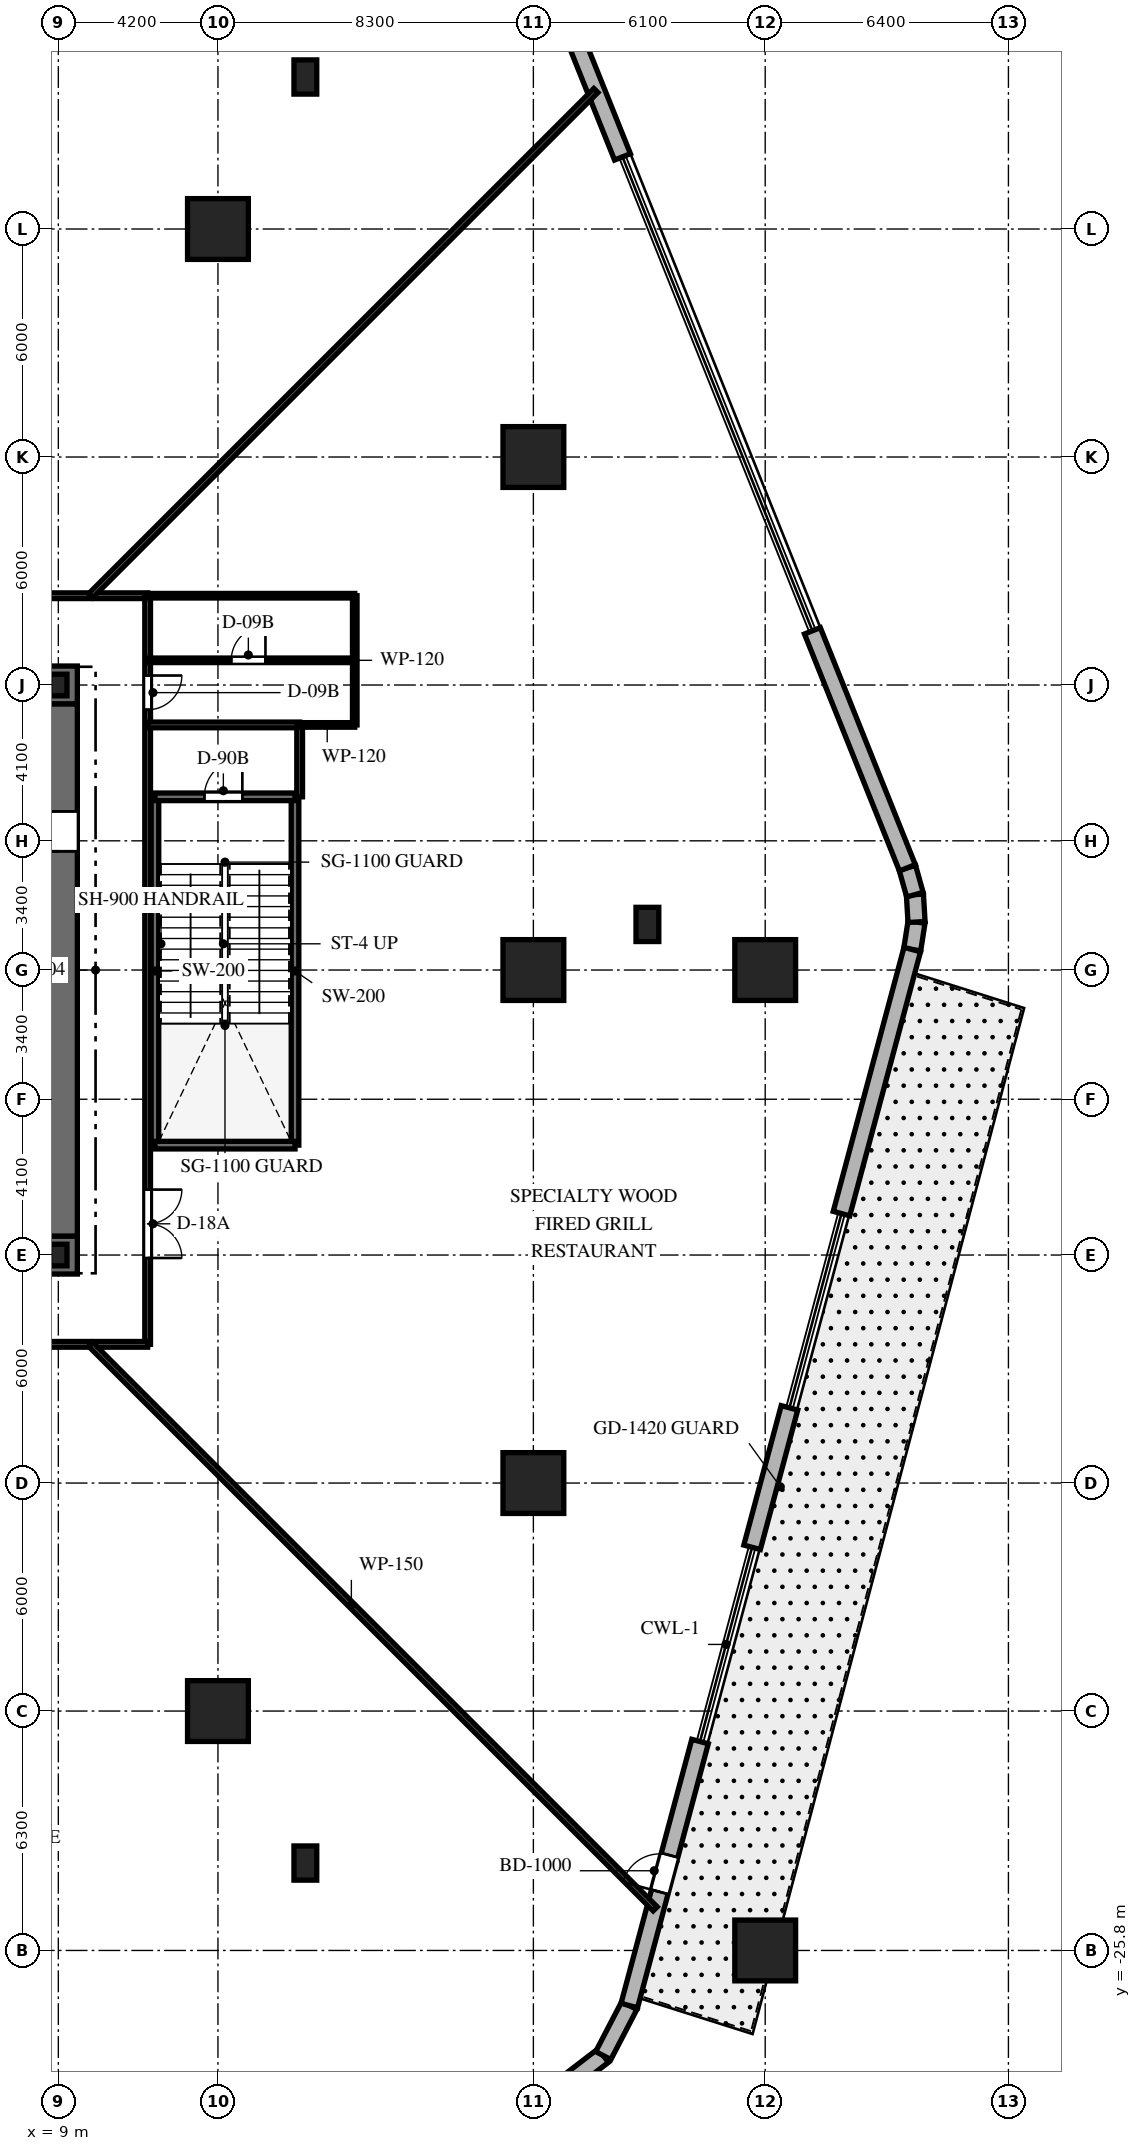
"""IFC4 building model, lengths in metres.
Left out: names, types, materials, properties, quantities, classifications, styles, units other than length and angle.
Written with IfcOpenShell. Run it as: python <this file> out.ifc"""

import sys

from ifc_helpers import new_model, si_unit, direction, frame, frame_2d, origin, origin_2d, place, context, subcontext, project, spatial, rectangle, i_section, extrude, element, fill, save


model = new_model("IFC4")
c1 = context("Model", 3, precision=1e-05, world=origin(), true_north=direction((0.0, 1.0)))
c2 = subcontext(c1, "Body", "Model", "MODEL_VIEW")
j1 = project(units=[si_unit("LENGTHUNIT", "METRE"), si_unit("PLANEANGLEUNIT", "RADIAN")], contexts=[c1])
p1 = place(None, origin())
s1 = spatial("IfcSite", under=j1, at=p1, CompositionType="ELEMENT")
p2 = place(p1, origin())
s2 = spatial("IfcBuilding", under=s1, at=p2, CompositionType="ELEMENT")
p3 = place(p2, frame((0.0, 0.0, 6.0)))
s3 = spatial("IfcBuildingStorey", under=s2, at=p3, CompositionType="ELEMENT", Elevation=6.0)
p4 = place(p3, frame((-9.5, -7.5, 0.0), z_axis=(0.0, 0.0, 1.0), x_axis=(1.0, 0.0, 0.0)))
e1 = element("IfcWall", 1, at=p4, inside=s3, PredefinedType="SHEAR", context=c2, shape_type="SweptSolid", body=[
    extrude(rectangle(XDim=19.0, YDim=1.0, at=frame_2d((9.5, 0.0))), origin(), (0.0, 0.0, 1.0), 5.4),
])
p5 = place(p4, frame((9.55, 0.0, 0.0)))
e2 = element("IfcOpeningElement", 2, at=p5, cuts=e1, PredefinedType="OPENING", context=c2, shape_type="SweptSolid", body=[
    extrude(rectangle(XDim=1.0, YDim=2.15, at=frame_2d((0.5, 1.075))), frame((0.0, 0.51, 0.0), z_axis=(0.0, -1.0, 0.0), x_axis=(1.0, 0.0, 0.0)), (0.0, 0.0, 1.0), 1.02),
])
p6 = place(p3, frame((1.85, 7.5, 0.0), z_axis=(0.0, 0.0, 1.0), x_axis=(1.0, 0.0, 0.0)))
e3 = element("IfcWall", 3, at=p6, inside=s3, PredefinedType="SHEAR", context=c2, shape_type="SweptSolid", body=[
    extrude(rectangle(XDim=7.65, YDim=1.0, at=frame_2d((3.825, 0.0))), origin(), (0.0, 0.0, 1.0), 5.4),
])
p7 = place(p3, frame((9.0, -7.0, 0.0), z_axis=(0.0, 0.0, 1.0), x_axis=(0.0, 1.0, 0.0)))
e4 = element("IfcWall", 4, at=p7, inside=s3, PredefinedType="SHEAR", context=c2, shape_type="SweptSolid", body=[
    extrude(rectangle(XDim=14.0, YDim=1.0, at=frame_2d((7.0, 0.0))), origin(), (0.0, 0.0, 1.0), 5.4),
])
p8 = place(p7, frame((10.125, 0.0, 0.0)))
e5 = element("IfcOpeningElement", 5, at=p8, cuts=e4, PredefinedType="OPENING", context=c2, shape_type="SweptSolid", body=[
    extrude(rectangle(XDim=1.05, YDim=2.15, at=frame_2d((0.525, 1.075))), frame((0.0, 0.51, 0.0), z_axis=(0.0, -1.0, 0.0), x_axis=(1.0, 0.0, 0.0)), (0.0, 0.0, 1.0), 1.02),
])
for number, where, z_axis, x_axis in (
    (6, (11.542, -4.608, 0.0), (0.0, 0.0, 1.0), (0.0, 1.0, 0.0)),
    (7, (15.228, -4.608, 0.0), (0.0, 0.0, 1.0), (0.0, 1.0, 0.0)),
):
    element("IfcWall", number, at=place(p3, frame(where, z_axis=z_axis, x_axis=x_axis)), inside=s3, PredefinedType="SHEAR", context=c2, shape_type="SweptSolid", body=[
        extrude(rectangle(XDim=9.166, YDim=0.2, at=frame_2d((4.583, 0.0))), origin(), (0.0, 0.0, 1.0), 5.4),
    ])
p9 = place(p3, frame((11.542, -4.608, 0.0), z_axis=(0.0, 0.0, 1.0), x_axis=(1.0, 0.0, 0.0)))
e8 = element("IfcWall", 8, at=p9, inside=s3, PredefinedType="SHEAR", context=c2, shape_type="SweptSolid", body=[
    extrude(rectangle(XDim=3.686, YDim=0.2, at=frame_2d((1.843, 0.0))), origin(), (0.0, 0.0, 1.0), 5.4),
])
p10 = place(p3, frame((11.542, 4.558, 0.0), z_axis=(0.0, 0.0, 1.0), x_axis=(1.0, 0.0, 0.0)))
e9 = element("IfcWall", 9, at=p10, inside=s3, PredefinedType="SHEAR", context=c2, shape_type="SweptSolid", body=[
    extrude(rectangle(XDim=3.686, YDim=0.2, at=frame_2d((1.843, 0.0))), origin(), (0.0, 0.0, 1.0), 5.4),
])
p11 = place(p10, frame((1.3, 0.0, 0.0)))
e10 = element("IfcOpeningElement", 10, at=p11, cuts=e9, PredefinedType="OPENING", context=c2, shape_type="SweptSolid", body=[
    extrude(rectangle(XDim=1.0, YDim=2.15, at=frame_2d((0.5, 1.075))), frame((0.0, 0.11, 0.0), z_axis=(0.0, -1.0, 0.0), x_axis=(1.0, 0.0, 0.0)), (0.0, 0.0, 1.0), 0.22),
])
for number, where, z_axis, x_axis in (
    (11, (9.0, -7.5, 0.0), (0.0, 0.0, 1.0), (1.0, 0.0, 0.0)),
    (12, (9.0, 7.5, 0.0), (0.0, 0.0, 1.0), (1.0, 0.0, 0.0)),
):
    element("IfcColumn", number, at=place(p3, frame(where, z_axis=z_axis, x_axis=x_axis)), inside=s3, PredefinedType="COLUMN", context=c2, shape_type="SweptSolid", body=[
        extrude(i_section(OverallWidth=0.454, OverallDepth=0.569, WebThickness=0.078, FlangeThickness=0.125, at=origin_2d()), origin(), (0.0, 0.0, 1.0), 5.4),
    ])
for number, where, z_axis, x_axis in (
    (13, (21.5, -13.5, 0.0), (0.0, 0.0, 1.0), (1.0, 0.0, 0.0)),
    (14, (21.5, 0.0, 0.0), (0.0, 0.0, 1.0), (1.0, 0.0, 0.0)),
    (15, (21.5, 13.5, 0.0), (0.0, 0.0, 1.0), (1.0, 0.0, 0.0)),
    (16, (13.2, -19.5, 0.0), (0.0, 0.0, 1.0), (1.0, 0.0, 0.0)),
    (17, (13.2, 19.5, 0.0), (0.0, 0.0, 1.0), (1.0, 0.0, 0.0)),
    (18, (27.6, -25.8, 0.0), (0.0, 0.0, 1.0), (1.0, 0.0, 0.0)),
    (19, (27.6, 0.0, 0.0), (0.0, 0.0, 1.0), (1.0, 0.0, 0.0)),
):
    element("IfcColumn", number, at=place(p3, frame(where, z_axis=z_axis, x_axis=x_axis)), inside=s3, PredefinedType="COLUMN", context=c2, shape_type="SweptSolid", body=[
        extrude(rectangle(XDim=1.6, YDim=1.6, at=origin_2d()), origin(), (0.0, 0.0, 1.0), 5.4),
    ])
for number, where, z_axis, x_axis in (
    (20, (15.5, -23.5, 0.0), (0.0, 0.0, 1.0), (1.0, 0.0, 0.0)),
    (21, (24.5, 1.2, 0.0), (0.0, 0.0, 1.0), (1.0, 0.0, 0.0)),
    (22, (15.5, 23.5, 0.0), (0.0, 0.0, 1.0), (1.0, 0.0, 0.0)),
):
    element("IfcColumn", number, at=place(p3, frame(where, z_axis=z_axis, x_axis=x_axis)), inside=s3, PredefinedType="PILASTER", context=c2, shape_type="SweptSolid", body=[
        extrude(rectangle(XDim=0.6, YDim=0.9, at=origin_2d()), origin(), (0.0, 0.0, 1.0), 5.4),
    ])
p12 = place(p3, frame((22.182, -29.454, 0.0), z_axis=(0.0, 0.0, 1.0), x_axis=(0.793363842704, 0.608747741754, 0.0)))
e23 = element("IfcWall", 23, at=p12, inside=s3, PredefinedType="SOLIDWALL", context=c2, shape_type="SweptSolid", body=[
    extrude(rectangle(XDim=1.459, YDim=0.45, at=frame_2d((0.729, 0.0))), origin(), (0.0, 0.0, 1.0), 4.05),
])
p13 = place(p3, frame((23.339, -28.566, 0.0), z_axis=(0.0, 0.0, 1.0), x_axis=(0.461699810705, 0.887036236461, 0.0)))
e24 = element("IfcWall", 24, at=p13, inside=s3, PredefinedType="SOLIDWALL", context=c2, shape_type="SweptSolid", body=[
    extrude(rectangle(XDim=1.484, YDim=0.45, at=frame_2d((0.742, 0.0))), origin(), (0.0, 0.0, 1.0), 4.05),
])
p14 = place(p3, frame((31.469, 0.539, 0.0), z_axis=(0.0, 0.0, 1.0), x_axis=(0.154082468729, 0.988057990621, 0.0)))
e25 = element("IfcWall", 25, at=p14, inside=s3, PredefinedType="SOLIDWALL", context=c2, shape_type="SweptSolid", body=[
    extrude(rectangle(XDim=0.734, YDim=0.45, at=frame_2d((0.367, 0.0))), origin(), (0.0, 0.0, 1.0), 4.05),
])
p15 = place(p3, frame((31.582, 1.264, 0.0), z_axis=(0.0, 0.0, 1.0), x_axis=(-0.059555119752, 0.998225018576, 0.0)))
e26 = element("IfcWall", 26, at=p15, inside=s3, PredefinedType="SOLIDWALL", context=c2, shape_type="SweptSolid", body=[
    extrude(rectangle(XDim=0.721, YDim=0.45, at=frame_2d((0.361, 0.0))), origin(), (0.0, 0.0, 1.0), 4.05),
])
p16 = place(p3, frame((31.539, 1.984, 0.0), z_axis=(0.0, 0.0, 1.0), x_axis=(-0.270543197703, 0.962707836354, 0.0)))
e27 = element("IfcWall", 27, at=p16, inside=s3, PredefinedType="SOLIDWALL", context=c2, shape_type="SweptSolid", body=[
    extrude(rectangle(XDim=0.734, YDim=0.45, at=frame_2d((0.367, 0.0))), origin(), (0.0, 0.0, 1.0), 4.05),
])
p17 = place(p3, frame((24.024, -27.25, 0.0), z_axis=(0.0, 0.0, 1.0), x_axis=(0.25880339056, 0.965930020775, 0.0)))
e28 = element("IfcWall", 28, at=p17, inside=s3, PredefinedType="SOLIDWALL", context=c2, shape_type="SweptSolid", body=[
    extrude(rectangle(XDim=7.192, YDim=0.45, at=frame_2d((3.596, 0.0))), origin(), (0.0, 0.0, 1.0), 4.05),
])
p18 = place(p17, frame((3.096, 0.0, 0.0)))
e29 = element("IfcOpeningElement", 29, at=p18, cuts=e28, PredefinedType="OPENING", context=c2, shape_type="SweptSolid", body=[
    extrude(rectangle(XDim=1.0, YDim=2.15, at=frame_2d((0.5, 1.075))), frame((0.0, 0.235, 0.0), z_axis=(0.0, -1.0, 0.0), x_axis=(1.0, 0.0, 0.0)), (0.0, 0.0, 1.0), 0.47),
])
p19 = place(p3, frame((27.255, -15.191, 0.0), z_axis=(0.0, 0.0, 1.0), x_axis=(0.258798174346, 0.96593141835, 0.0)))
e30 = element("IfcWall", 30, at=p19, inside=s3, PredefinedType="SOLIDWALL", context=c2, shape_type="SweptSolid", body=[
    extrude(rectangle(XDim=3.8, YDim=0.45, at=frame_2d((1.9, 0.0))), origin(), (0.0, 0.0, 1.0), 4.05),
])
p20 = place(p3, frame((29.608, -6.409, 0.0), z_axis=(0.0, 0.0, 1.0), x_axis=(0.258786419646, 0.965934567663, 0.0)))
e31 = element("IfcWall", 31, at=p20, inside=s3, PredefinedType="SOLIDWALL", context=c2, shape_type="SweptSolid", body=[
    extrude(rectangle(XDim=7.193, YDim=0.45, at=frame_2d((3.596, 0.0))), origin(), (0.0, 0.0, 1.0), 4.05),
])
p21 = place(p3, frame((31.341, 2.69, 0.0), z_axis=(0.0, 0.0, 1.0), x_axis=(-0.371948252928, 0.928253466002, 0.0)))
e32 = element("IfcWall", 32, at=p21, inside=s3, PredefinedType="SOLIDWALL", context=c2, shape_type="SweptSolid", body=[
    extrude(rectangle(XDim=6.718, YDim=0.45, at=frame_2d((3.359, 0.0))), origin(), (0.0, 0.0, 1.0), 4.05),
])
p22 = place(p3, frame((23.844, 21.398, 0.0), z_axis=(0.0, 0.0, 1.0), x_axis=(-0.37196701808, 0.928245946644, 0.0)))
e33 = element("IfcWall", 33, at=p22, inside=s3, PredefinedType="SOLIDWALL", context=c2, shape_type="SweptSolid", body=[
    extrude(rectangle(XDim=6.719, YDim=0.45, at=frame_2d((3.359, 0.0))), origin(), (0.0, 0.0, 1.0), 4.05),
])
p23 = place(p3, frame((-11.35, 9.85, 0.0), z_axis=(0.0, 0.0, 1.0), x_axis=(1.0, 0.0, 0.0)))
e34 = element("IfcWall", 34, at=p23, inside=s3, PredefinedType="PARTITIONING", context=c2, shape_type="SweptSolid", body=[
    extrude(rectangle(XDim=22.7, YDim=0.15, at=frame_2d((11.35, 0.0))), origin(), (0.0, 0.0, 1.0), 4.122),
])
p24 = place(p23, frame((10.85, 0.0, 0.0)))
e35 = element("IfcOpeningElement", 35, at=p24, cuts=e34, PredefinedType="OPENING", context=c2, shape_type="SweptSolid", body=[
    extrude(rectangle(XDim=1.0, YDim=2.03, at=frame_2d((0.5, 1.015))), frame((0.0, 0.085, 0.0), z_axis=(0.0, -1.0, 0.0), x_axis=(1.0, 0.0, 0.0)), (0.0, 0.0, 1.0), 0.17),
])
p25 = place(p3, frame((11.35, 9.85, 0.0), z_axis=(0.0, 0.0, 1.0), x_axis=(0.0, -1.0, 0.0)))
e36 = element("IfcWall", 36, at=p25, inside=s3, PredefinedType="PARTITIONING", context=c2, shape_type="SweptSolid", body=[
    extrude(rectangle(XDim=19.7, YDim=0.15, at=frame_2d((9.85, 0.0))), origin(), (0.0, 0.0, 1.0), 4.122),
])
p26 = place(p25, frame((2.1, 0.0, 0.0)))
e37 = element("IfcOpeningElement", 37, at=p26, cuts=e36, PredefinedType="OPENING", context=c2, shape_type="SweptSolid", body=[
    extrude(rectangle(XDim=0.9, YDim=2.03, at=frame_2d((0.45, 1.015))), frame((0.0, 0.085, 0.0), z_axis=(0.0, -1.0, 0.0), x_axis=(1.0, 0.0, 0.0)), (0.0, 0.0, 1.0), 0.17),
])
p27 = place(p25, frame((15.628, 0.0, 0.0)))
e38 = element("IfcOpeningElement", 38, at=p27, cuts=e36, PredefinedType="OPENING", context=c2, shape_type="SweptSolid", body=[
    extrude(rectangle(XDim=1.8, YDim=2.2, at=frame_2d((0.9, 1.1))), frame((0.0, 0.085, 0.0), z_axis=(0.0, -1.0, 0.0), x_axis=(1.0, 0.0, 0.0)), (0.0, 0.0, 1.0), 0.17),
])
p28 = place(p3, frame((11.35, -9.85, 0.0), z_axis=(0.0, 0.0, 1.0), x_axis=(-1.0, 0.0, 0.0)))
e39 = element("IfcWall", 39, at=p28, inside=s3, PredefinedType="PARTITIONING", context=c2, shape_type="SweptSolid", body=[
    extrude(rectangle(XDim=22.7, YDim=0.15, at=frame_2d((11.35, 0.0))), origin(), (0.0, 0.0, 1.0), 4.122),
])
p29 = place(p28, frame((10.45, 0.0, 0.0)))
e40 = element("IfcOpeningElement", 40, at=p29, cuts=e39, PredefinedType="OPENING", context=c2, shape_type="SweptSolid", body=[
    extrude(rectangle(XDim=1.8, YDim=2.2, at=frame_2d((0.9, 1.1))), frame((0.0, 0.085, 0.0), z_axis=(0.0, -1.0, 0.0), x_axis=(1.0, 0.0, 0.0)), (0.0, 0.0, 1.0), 0.17),
])
p30 = place(p3, frame((11.35, 6.45, 0.0), z_axis=(0.0, 0.0, 1.0), x_axis=(1.0, 0.0, 0.0)))
e41 = element("IfcWall", 41, at=p30, inside=s3, PredefinedType="PARTITIONING", context=c2, shape_type="SweptSolid", body=[
    extrude(rectangle(XDim=4.0, YDim=0.15, at=frame_2d((2.0, 0.0))), origin(), (0.0, 0.0, 1.0), 5.08),
])
p31 = place(p3, frame((15.35, 4.558, 0.0), z_axis=(0.0, 0.0, 1.0), x_axis=(0.0, 1.0, 0.0)))
e42 = element("IfcWall", 42, at=p31, inside=s3, PredefinedType="PARTITIONING", context=c2, shape_type="SweptSolid", body=[
    extrude(rectangle(XDim=1.892, YDim=0.15, at=frame_2d((0.946, 0.0))), origin(), (0.0, 0.0, 1.0), 5.08),
])
p32 = place(p3, frame((15.35, 6.45, 0.0), z_axis=(0.0, 0.0, 1.0), x_axis=(1.0, 0.0, 0.0)))
e43 = element("IfcWall", 43, at=p32, inside=s3, PredefinedType="PARTITIONING", context=c2, shape_type="SweptSolid", body=[
    extrude(rectangle(XDim=1.45, YDim=0.12, at=frame_2d((0.725, 0.0))), origin(), (0.0, 0.0, 1.0), 5.08),
])
p33 = place(p3, frame((16.8, 6.45, 0.0), z_axis=(0.0, 0.0, 1.0), x_axis=(0.0, 1.0, 0.0)))
e44 = element("IfcWall", 44, at=p33, inside=s3, PredefinedType="PARTITIONING", context=c2, shape_type="SweptSolid", body=[
    extrude(rectangle(XDim=3.4, YDim=0.12, at=frame_2d((1.7, 0.0))), origin(), (0.0, 0.0, 1.0), 5.08),
])
p34 = place(p3, frame((11.35, 9.85, 0.0), z_axis=(0.0, 0.0, 1.0), x_axis=(1.0, 0.0, 0.0)))
e45 = element("IfcWall", 45, at=p34, inside=s3, PredefinedType="PARTITIONING", context=c2, shape_type="SweptSolid", body=[
    extrude(rectangle(XDim=5.45, YDim=0.12, at=frame_2d((2.725, 0.0))), origin(), (0.0, 0.0, 1.0), 4.214),
])
p35 = place(p3, frame((11.35, 8.15, 0.0), z_axis=(0.0, 0.0, 1.0), x_axis=(1.0, 0.0, 0.0)))
e46 = element("IfcWall", 46, at=p35, inside=s3, PredefinedType="PARTITIONING", context=c2, shape_type="SweptSolid", body=[
    extrude(rectangle(XDim=5.45, YDim=0.12, at=frame_2d((2.725, 0.0))), origin(), (0.0, 0.0, 1.0), 5.08),
])
p36 = place(p35, frame((2.2, 0.0, 0.0)))
e47 = element("IfcOpeningElement", 47, at=p36, cuts=e46, PredefinedType="OPENING", context=c2, shape_type="SweptSolid", body=[
    extrude(rectangle(XDim=0.9, YDim=2.03, at=frame_2d((0.45, 1.015))), frame((0.0, 0.07, 0.0), z_axis=(0.0, -1.0, 0.0), x_axis=(1.0, 0.0, 0.0)), (0.0, 0.0, 1.0), 0.14),
])
p37 = place(p3, frame((9.85, -9.85, 0.0), z_axis=(0.0, 0.0, 1.0), x_axis=(0.707106781187, -0.707106781187, 0.0)))
e48 = element("IfcWall", 48, at=p37, inside=s3, PredefinedType="PARTITIONING", context=c2, shape_type="SweptSolid", body=[
    extrude(rectangle(XDim=21.009, YDim=0.15, at=frame_2d((10.504, 0.0))), origin(), (0.0, 0.0, 1.0), 4.07),
])
p38 = place(p3, frame((9.85, 9.85, 0.0), z_axis=(0.0, 0.0, 1.0), x_axis=(0.707106781187, 0.707106781187, 0.0)))
e49 = element("IfcWall", 49, at=p38, inside=s3, PredefinedType="PARTITIONING", context=c2, shape_type="SweptSolid", body=[
    extrude(rectangle(XDim=18.801, YDim=0.15, at=frame_2d((9.401, 0.0))), origin(), (0.0, 0.0, 1.0), 4.122),
])
p39 = place(p18, origin())
e50 = element("IfcDoor", 50, at=p39, inside=s3, OperationType="SINGLE_SWING_LEFT", PredefinedType="DOOR", context=c2, shape_type="SweptSolid", body=[
    extrude(rectangle(XDim=1.0, YDim=2.15, at=frame_2d((0.5, 1.075))), frame((0.0, 0.025, 0.0), z_axis=(0.0, -1.0, 0.0), x_axis=(1.0, 0.0, 0.0)), (0.0, 0.0, 1.0), 0.05),
])
fill(e29, e50)
p40 = place(p8, origin())
e51 = element("IfcDoor", 51, at=p40, inside=s3, OperationType="SINGLE_SWING_LEFT", PredefinedType="DOOR", context=c2, shape_type="SweptSolid", body=[
    extrude(rectangle(XDim=1.05, YDim=2.15, at=frame_2d((0.525, 1.075))), frame((0.0, 0.025, 0.0), z_axis=(0.0, -1.0, 0.0), x_axis=(1.0, 0.0, 0.0)), (0.0, 0.0, 1.0), 0.05),
])
fill(e5, e51)
p41 = place(p11, origin())
e52 = element("IfcDoor", 52, at=p41, inside=s3, OperationType="SINGLE_SWING_RIGHT", PredefinedType="DOOR", context=c2, shape_type="SweptSolid", body=[
    extrude(rectangle(XDim=1.0, YDim=2.15, at=frame_2d((0.5, 1.075))), frame((0.0, 0.025, 0.0), z_axis=(0.0, -1.0, 0.0), x_axis=(1.0, 0.0, 0.0)), (0.0, 0.0, 1.0), 0.05),
])
fill(e10, e52)
p42 = place(p26, origin())
e53 = element("IfcDoor", 53, at=p42, inside=s3, OperationType="SINGLE_SWING_LEFT", PredefinedType="DOOR", context=c2, shape_type="SweptSolid", body=[
    extrude(rectangle(XDim=0.9, YDim=2.03, at=frame_2d((0.45, 1.015))), frame((0.0, 0.025, 0.0), z_axis=(0.0, -1.0, 0.0), x_axis=(1.0, 0.0, 0.0)), (0.0, 0.0, 1.0), 0.05),
])
fill(e37, e53)
p43 = place(p36, origin())
e54 = element("IfcDoor", 54, at=p43, inside=s3, OperationType="SINGLE_SWING_RIGHT", PredefinedType="DOOR", context=c2, shape_type="SweptSolid", body=[
    extrude(rectangle(XDim=0.9, YDim=2.03, at=frame_2d((0.45, 1.015))), frame((0.0, 0.025, 0.0), z_axis=(0.0, -1.0, 0.0), x_axis=(1.0, 0.0, 0.0)), (0.0, 0.0, 1.0), 0.05),
])
fill(e47, e54)
p44 = place(p27, origin())
e55 = element("IfcDoor", 55, at=p44, inside=s3, OperationType="DOUBLE_SWING_LEFT", PredefinedType="DOOR", context=c2, shape_type="SweptSolid", body=[
    extrude(rectangle(XDim=1.8, YDim=2.2, at=frame_2d((0.9, 1.1))), frame((0.0, 0.025, 0.0), z_axis=(0.0, -1.0, 0.0), x_axis=(1.0, 0.0, 0.0)), (0.0, 0.0, 1.0), 0.05),
])
fill(e38, e55)
save(model, sys.argv[1])
